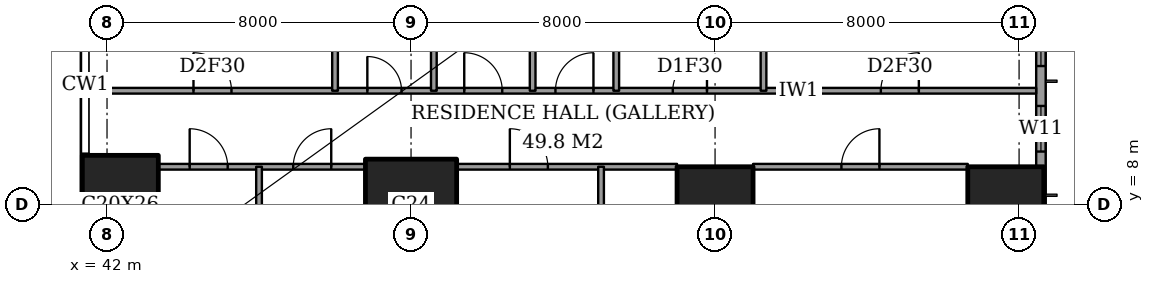
"""IFC4 building model, lengths in metres.
Left out: names, types, materials, properties, quantities, classifications, styles, units other than length and angle.
Written with IfcOpenShell. Run it as: python <this file> out.ifc"""

import sys

from ifc_helpers import new_model, si_unit, direction, frame, frame_2d, origin, origin_2d, place, context, subcontext, project, spatial, rectangle, extrude, element, fill, save


model = new_model("IFC4")
c1 = context("Model", 3, precision=1e-05, world=origin(), true_north=direction((0.0, 1.0)))
c2 = subcontext(c1, "Body", "Model", "MODEL_VIEW")
j1 = project(units=[si_unit("LENGTHUNIT", "METRE"), si_unit("PLANEANGLEUNIT", "RADIAN")], contexts=[c1])
p1 = place(None, origin())
s1 = spatial("IfcSite", under=j1, at=p1, CompositionType="ELEMENT")
p2 = place(p1, origin())
s2 = spatial("IfcBuilding", under=s1, at=p2, CompositionType="ELEMENT")
p3 = place(p2, frame((0.0, 0.0, 168.2)))
s3 = spatial("IfcBuildingStorey", under=s2, at=p3, CompositionType="ELEMENT", Elevation=168.2)
p4 = place(p3, frame((42.35, 8.0, 0.0), z_axis=(0.0, 0.0, 1.0), x_axis=(1.0, 0.0, 0.0)))
e1 = element("IfcColumn", 1, at=p4, inside=s3, PredefinedType="COLUMN", context=c2, shape_type="SweptSolid", body=[
    extrude(rectangle(XDim=2.0, YDim=2.6, at=origin_2d()), origin(), (0.0, 0.0, 1.0), 3.6),
])
p5 = place(p3, frame((50.0, 8.0, 0.0), z_axis=(0.0, 0.0, 1.0), x_axis=(1.0, 0.0, 0.0)))
e2 = element("IfcColumn", 2, at=p5, inside=s3, PredefinedType="COLUMN", context=c2, shape_type="SweptSolid", body=[
    extrude(rectangle(XDim=2.4, YDim=2.4, at=origin_2d()), origin(), (0.0, 0.0, 1.0), 3.6),
])
for number, where, z_axis, x_axis in (
    (3, (58.0, 8.0, 0.0), (0.0, 0.0, 1.0), (1.0, 0.0, 0.0)),
    (4, (65.65, 8.0, 0.0), (0.0, 0.0, 1.0), (1.0, 0.0, 0.0)),
):
    element("IfcColumn", number, at=place(p3, frame(where, z_axis=z_axis, x_axis=x_axis)), inside=s3, PredefinedType="COLUMN", context=c2, shape_type="SweptSolid", body=[
        extrude(rectangle(XDim=2.0, YDim=2.0, at=origin_2d()), origin(), (0.0, 0.0, 1.0), 3.6),
    ])
p6 = place(p3, frame((66.575, 3.175, 0.0), z_axis=(0.0, 0.0, 1.0), x_axis=(0.0, 1.0, 0.0)))
e5 = element("IfcWall", 5, at=p6, inside=s3, PredefinedType="SOLIDWALL", context=c2, shape_type="SweptSolid", body=[
    extrude(rectangle(XDim=41.65, YDim=0.25, at=frame_2d((20.825, 0.0))), origin(), (0.0, 0.0, 1.0), 3.6),
])
p7 = place(p6, frame((0.775, 0.0, 0.4)))
e6 = element("IfcOpeningElement", 6, at=p7, cuts=e5, PredefinedType="OPENING", context=c2, shape_type="SweptSolid", body=[
    extrude(rectangle(XDim=2.4, YDim=2.2, at=frame_2d((1.2, 1.1))), frame((0.0, 0.135, 0.0), z_axis=(0.0, -1.0, 0.0), x_axis=(1.0, 0.0, 0.0)), (0.0, 0.0, 1.0), 0.27),
])
p8 = place(p6, frame((6.225, 0.0, 0.4)))
e7 = element("IfcOpeningElement", 7, at=p8, cuts=e5, PredefinedType="OPENING", context=c2, shape_type="SweptSolid", body=[
    extrude(rectangle(XDim=1.2, YDim=2.2, at=frame_2d((0.6, 1.1))), frame((0.0, 0.135, 0.0), z_axis=(0.0, -1.0, 0.0), x_axis=(1.0, 0.0, 0.0)), (0.0, 0.0, 1.0), 0.27),
])
p9 = place(p6, frame((8.475, 0.0, 0.4)))
e8 = element("IfcOpeningElement", 8, at=p9, cuts=e5, PredefinedType="OPENING", context=c2, shape_type="SweptSolid", body=[
    extrude(rectangle(XDim=2.4, YDim=2.2, at=frame_2d((1.2, 1.1))), frame((0.0, 0.135, 0.0), z_axis=(0.0, -1.0, 0.0), x_axis=(1.0, 0.0, 0.0)), (0.0, 0.0, 1.0), 0.27),
])
p10 = place(p6, frame((15.775, 0.0, 0.4)))
e9 = element("IfcOpeningElement", 9, at=p10, cuts=e5, PredefinedType="OPENING", context=c2, shape_type="SweptSolid", body=[
    extrude(rectangle(XDim=2.4, YDim=2.2, at=frame_2d((1.2, 1.1))), frame((0.0, 0.135, 0.0), z_axis=(0.0, -1.0, 0.0), x_axis=(1.0, 0.0, 0.0)), (0.0, 0.0, 1.0), 0.27),
])
p11 = place(p6, frame((23.475, 0.0, 0.4)))
e10 = element("IfcOpeningElement", 10, at=p11, cuts=e5, PredefinedType="OPENING", context=c2, shape_type="SweptSolid", body=[
    extrude(rectangle(XDim=2.4, YDim=2.2, at=frame_2d((1.2, 1.1))), frame((0.0, 0.135, 0.0), z_axis=(0.0, -1.0, 0.0), x_axis=(1.0, 0.0, 0.0)), (0.0, 0.0, 1.0), 0.27),
])
p12 = place(p6, frame((30.975, 0.0, 0.4)))
e11 = element("IfcOpeningElement", 11, at=p12, cuts=e5, PredefinedType="OPENING", context=c2, shape_type="SweptSolid", body=[
    extrude(rectangle(XDim=2.4, YDim=2.2, at=frame_2d((1.2, 1.1))), frame((0.0, 0.135, 0.0), z_axis=(0.0, -1.0, 0.0), x_axis=(1.0, 0.0, 0.0)), (0.0, 0.0, 1.0), 0.27),
])
p13 = place(p6, frame((34.5, 0.0, 0.4)))
e12 = element("IfcOpeningElement", 12, at=p13, cuts=e5, PredefinedType="OPENING", context=c2, shape_type="SweptSolid", body=[
    extrude(rectangle(XDim=1.2, YDim=2.2, at=frame_2d((0.6, 1.1))), frame((0.0, 0.135, 0.0), z_axis=(0.0, -1.0, 0.0), x_axis=(1.0, 0.0, 0.0)), (0.0, 0.0, 1.0), 0.27),
])
p14 = place(p6, frame((38.475, 0.0, 0.4)))
e13 = element("IfcOpeningElement", 13, at=p14, cuts=e5, PredefinedType="OPENING", context=c2, shape_type="SweptSolid", body=[
    extrude(rectangle(XDim=2.4, YDim=2.2, at=frame_2d((1.2, 1.1))), frame((0.0, 0.135, 0.0), z_axis=(0.0, -1.0, 0.0), x_axis=(1.0, 0.0, 0.0)), (0.0, 0.0, 1.0), 0.27),
])
p15 = place(p3, frame((43.35, 9.0, 0.0), z_axis=(0.0, 0.0, 1.0), x_axis=(1.0, 0.0, 0.0)))
e14 = element("IfcWall", 14, at=p15, inside=s3, PredefinedType="PARTITIONING", context=c2, shape_type="SweptSolid", body=[
    extrude(rectangle(XDim=5.45, YDim=0.15, at=frame_2d((2.725, 0.0))), origin(), (0.0, 0.0, 1.0), 3.25),
])
p16 = place(p15, frame((3.55, 0.0, 0.0)))
e15 = element("IfcOpeningElement", 15, at=p16, cuts=e14, PredefinedType="OPENING", context=c2, shape_type="SweptSolid", body=[
    extrude(rectangle(XDim=1.0, YDim=2.1, at=frame_2d((0.5, 1.05))), frame((0.0, 0.085, 0.0), z_axis=(0.0, -1.0, 0.0), x_axis=(1.0, 0.0, 0.0)), (0.0, 0.0, 1.0), 0.17),
])
p17 = place(p15, frame((0.825, 0.0, 0.0)))
e16 = element("IfcOpeningElement", 16, at=p17, cuts=e14, PredefinedType="OPENING", context=c2, shape_type="SweptSolid", body=[
    extrude(rectangle(XDim=1.0, YDim=2.1, at=frame_2d((0.5, 1.05))), frame((0.0, 0.085, 0.0), z_axis=(0.0, -1.0, 0.0), x_axis=(1.0, 0.0, 0.0)), (0.0, 0.0, 1.0), 0.17),
])
p18 = place(p3, frame((51.2, 9.0, 0.0), z_axis=(0.0, 0.0, 1.0), x_axis=(1.0, 0.0, 0.0)))
e17 = element("IfcWall", 17, at=p18, inside=s3, PredefinedType="PARTITIONING", context=c2, shape_type="SweptSolid", body=[
    extrude(rectangle(XDim=5.8, YDim=0.15, at=frame_2d((2.9, 0.0))), origin(), (0.0, 0.0, 1.0), 3.25),
])
p19 = place(p18, frame((1.4, 0.0, 0.0)))
e18 = element("IfcOpeningElement", 18, at=p19, cuts=e17, PredefinedType="OPENING", context=c2, shape_type="SweptSolid", body=[
    extrude(rectangle(XDim=1.0, YDim=2.1, at=frame_2d((0.5, 1.05))), frame((0.0, 0.085, 0.0), z_axis=(0.0, -1.0, 0.0), x_axis=(1.0, 0.0, 0.0)), (0.0, 0.0, 1.0), 0.17),
])
p20 = place(p3, frame((59.0, 9.0, 0.0), z_axis=(0.0, 0.0, 1.0), x_axis=(1.0, 0.0, 0.0)))
e19 = element("IfcWall", 19, at=p20, inside=s3, PredefinedType="PARTITIONING", context=c2, shape_type="SweptSolid", body=[
    extrude(rectangle(XDim=5.65, YDim=0.15, at=frame_2d((2.825, 0.0))), origin(), (0.0, 0.0, 1.0), 3.25),
])
p21 = place(p20, frame((2.325, 0.0, 0.0)))
e20 = element("IfcOpeningElement", 20, at=p21, cuts=e19, PredefinedType="OPENING", context=c2, shape_type="SweptSolid", body=[
    extrude(rectangle(XDim=1.0, YDim=2.1, at=frame_2d((0.5, 1.05))), frame((0.0, 0.085, 0.0), z_axis=(0.0, -1.0, 0.0), x_axis=(1.0, 0.0, 0.0)), (0.0, 0.0, 1.0), 0.17),
])
p22 = place(p3, frame((41.439, 11.0, 0.0), z_axis=(0.0, 0.0, 1.0), x_axis=(1.0, 0.0, 0.0)))
e21 = element("IfcWall", 21, at=p22, inside=s3, PredefinedType="PARTITIONING", context=c2, shape_type="SweptSolid", body=[
    extrude(rectangle(XDim=25.011, YDim=0.15, at=frame_2d((12.505, 0.0))), origin(), (0.0, 0.0, 1.0), 3.25),
])
p23 = place(p22, frame((12.361, 0.0, 0.0)))
e22 = element("IfcOpeningElement", 22, at=p23, cuts=e21, PredefinedType="OPENING", context=c2, shape_type="SweptSolid", body=[
    extrude(rectangle(XDim=1.0, YDim=2.1, at=frame_2d((0.5, 1.05))), frame((0.0, 0.085, 0.0), z_axis=(0.0, -1.0, 0.0), x_axis=(1.0, 0.0, 0.0)), (0.0, 0.0, 1.0), 0.17),
])
p24 = place(p22, frame((20.924, 0.0, 0.0)))
e23 = element("IfcOpeningElement", 23, at=p24, cuts=e21, PredefinedType="OPENING", context=c2, shape_type="SweptSolid", body=[
    extrude(rectangle(XDim=1.0, YDim=2.1, at=frame_2d((0.5, 1.05))), frame((0.0, 0.085, 0.0), z_axis=(0.0, -1.0, 0.0), x_axis=(1.0, 0.0, 0.0)), (0.0, 0.0, 1.0), 0.17),
])
p25 = place(p22, frame((15.448, 0.0, 0.0)))
e24 = element("IfcOpeningElement", 24, at=p25, cuts=e21, PredefinedType="OPENING", context=c2, shape_type="SweptSolid", body=[
    extrude(rectangle(XDim=0.9, YDim=2.1, at=frame_2d((0.45, 1.05))), frame((0.0, 0.085, 0.0), z_axis=(0.0, -1.0, 0.0), x_axis=(1.0, 0.0, 0.0)), (0.0, 0.0, 1.0), 0.17),
])
p26 = place(p22, frame((9.961, 0.0, 0.0)))
e25 = element("IfcOpeningElement", 25, at=p26, cuts=e21, PredefinedType="OPENING", context=c2, shape_type="SweptSolid", body=[
    extrude(rectangle(XDim=1.0, YDim=2.1, at=frame_2d((0.5, 1.05))), frame((0.0, 0.085, 0.0), z_axis=(0.0, -1.0, 0.0), x_axis=(1.0, 0.0, 0.0)), (0.0, 0.0, 1.0), 0.17),
])
p27 = place(p22, frame((7.411, 0.0, 0.0)))
e26 = element("IfcOpeningElement", 26, at=p27, cuts=e21, PredefinedType="OPENING", context=c2, shape_type="SweptSolid", body=[
    extrude(rectangle(XDim=0.9, YDim=2.1, at=frame_2d((0.45, 1.05))), frame((0.0, 0.085, 0.0), z_axis=(0.0, -1.0, 0.0), x_axis=(1.0, 0.0, 0.0)), (0.0, 0.0, 1.0), 0.17),
])
p28 = place(p22, frame((2.836, 0.0, 0.0)))
e27 = element("IfcOpeningElement", 27, at=p28, cuts=e21, PredefinedType="OPENING", context=c2, shape_type="SweptSolid", body=[
    extrude(rectangle(XDim=1.0, YDim=2.1, at=frame_2d((0.5, 1.05))), frame((0.0, 0.085, 0.0), z_axis=(0.0, -1.0, 0.0), x_axis=(1.0, 0.0, 0.0)), (0.0, 0.0, 1.0), 0.17),
])
p29 = place(p3, frame((46.0, -0.45, 0.0), z_axis=(0.0, 0.0, 1.0), x_axis=(0.0, 1.0, 0.0)))
e28 = element("IfcWall", 28, at=p29, inside=s3, PredefinedType="PARTITIONING", context=c2, shape_type="SweptSolid", body=[
    extrude(rectangle(XDim=9.45, YDim=0.15, at=frame_2d((4.725, 0.0))), origin(), (0.0, 0.0, 1.0), 3.25),
])
p30 = place(p3, frame((48.0, 11.0, 0.0), z_axis=(0.0, 0.0, 1.0), x_axis=(0.0, 1.0, 0.0)))
e29 = element("IfcWall", 29, at=p30, inside=s3, PredefinedType="PARTITIONING", context=c2, shape_type="SweptSolid", body=[
    extrude(rectangle(XDim=6.5, YDim=0.15, at=frame_2d((3.25, 0.0))), origin(), (0.0, 0.0, 1.0), 3.25),
])
p31 = place(p3, frame((50.6, 11.0, 0.0), z_axis=(0.0, 0.0, 1.0), x_axis=(0.0, 1.0, 0.0)))
e30 = element("IfcWall", 30, at=p31, inside=s3, PredefinedType="PARTITIONING", context=c2, shape_type="SweptSolid", body=[
    extrude(rectangle(XDim=3.8, YDim=0.15, at=frame_2d((1.9, 0.0))), origin(), (0.0, 0.0, 1.0), 3.25),
])
p32 = place(p3, frame((53.2, 11.0, 0.0), z_axis=(0.0, 0.0, 1.0), x_axis=(0.0, 1.0, 0.0)))
e31 = element("IfcWall", 31, at=p32, inside=s3, PredefinedType="PARTITIONING", context=c2, shape_type="SweptSolid", body=[
    extrude(rectangle(XDim=6.5, YDim=0.15, at=frame_2d((3.25, 0.0))), origin(), (0.0, 0.0, 1.0), 3.25),
])
p33 = place(p3, frame((55.0, -0.45, 0.0), z_axis=(0.0, 0.0, 1.0), x_axis=(0.0, 1.0, 0.0)))
e32 = element("IfcWall", 32, at=p33, inside=s3, PredefinedType="PARTITIONING", context=c2, shape_type="SweptSolid", body=[
    extrude(rectangle(XDim=9.45, YDim=0.15, at=frame_2d((4.725, 0.0))), origin(), (0.0, 0.0, 1.0), 3.25),
])
p34 = place(p3, frame((55.4, 11.0, 0.0), z_axis=(0.0, 0.0, 1.0), x_axis=(0.0, 1.0, 0.0)))
e33 = element("IfcWall", 33, at=p34, inside=s3, PredefinedType="PARTITIONING", context=c2, shape_type="SweptSolid", body=[
    extrude(rectangle(XDim=10.6, YDim=0.15, at=frame_2d((5.3, 0.0))), origin(), (0.0, 0.0, 1.0), 3.25),
])
p35 = place(p34, frame((8.05, 0.0, 0.0)))
e34 = element("IfcOpeningElement", 34, at=p35, cuts=e33, PredefinedType="OPENING", context=c2, shape_type="SweptSolid", body=[
    extrude(rectangle(XDim=1.0, YDim=2.1, at=frame_2d((0.5, 1.05))), frame((0.0, 0.085, 0.0), z_axis=(0.0, -1.0, 0.0), x_axis=(1.0, 0.0, 0.0)), (0.0, 0.0, 1.0), 0.17),
])
p36 = place(p3, frame((59.275, 11.0, 0.0), z_axis=(0.0, 0.0, 1.0), x_axis=(0.0, 1.0, 0.0)))
e35 = element("IfcWall", 35, at=p36, inside=s3, PredefinedType="PARTITIONING", context=c2, shape_type="SweptSolid", body=[
    extrude(rectangle(XDim=3.8, YDim=0.15, at=frame_2d((1.9, 0.0))), origin(), (0.0, 0.0, 1.0), 3.25),
])
p37 = place(p8, origin())
e36 = element("IfcWindow", 36, at=p37, inside=s3, PartitioningType="SINGLE_PANEL", PredefinedType="WINDOW", context=c2, shape_type="SweptSolid", body=[
    extrude(rectangle(XDim=1.2, YDim=2.2, at=frame_2d((0.6, 1.1))), frame((0.0, 0.03, 0.0), z_axis=(0.0, -1.0, 0.0), x_axis=(1.0, 0.0, 0.0)), (0.0, 0.0, 1.0), 0.06),
])
fill(e7, e36)
p38 = place(p9, origin())
e37 = element("IfcWindow", 37, at=p38, inside=s3, PartitioningType="SINGLE_PANEL", PredefinedType="WINDOW", context=c2, shape_type="SweptSolid", body=[
    extrude(rectangle(XDim=2.4, YDim=2.2, at=frame_2d((1.2, 1.1))), frame((0.0, 0.03, 0.0), z_axis=(0.0, -1.0, 0.0), x_axis=(1.0, 0.0, 0.0)), (0.0, 0.0, 1.0), 0.06),
])
fill(e8, e37)
p39 = place(p21, origin())
e38 = element("IfcDoor", 38, at=p39, inside=s3, OperationType="SINGLE_SWING_LEFT", PredefinedType="DOOR", context=c2, shape_type="SweptSolid", body=[
    extrude(rectangle(XDim=1.0, YDim=2.1, at=frame_2d((0.5, 1.05))), frame((0.0, 0.025, 0.0), z_axis=(0.0, -1.0, 0.0), x_axis=(1.0, 0.0, 0.0)), (0.0, 0.0, 1.0), 0.05),
])
fill(e20, e38)
p40 = place(p19, origin())
e39 = element("IfcDoor", 39, at=p40, inside=s3, OperationType="SINGLE_SWING_RIGHT", PredefinedType="DOOR", context=c2, shape_type="SweptSolid", body=[
    extrude(rectangle(XDim=1.0, YDim=2.1, at=frame_2d((0.5, 1.05))), frame((0.0, 0.025, 0.0), z_axis=(0.0, -1.0, 0.0), x_axis=(1.0, 0.0, 0.0)), (0.0, 0.0, 1.0), 0.05),
])
fill(e18, e39)
p41 = place(p16, origin())
e40 = element("IfcDoor", 40, at=p41, inside=s3, OperationType="SINGLE_SWING_LEFT", PredefinedType="DOOR", context=c2, shape_type="SweptSolid", body=[
    extrude(rectangle(XDim=1.0, YDim=2.1, at=frame_2d((0.5, 1.05))), frame((0.0, 0.025, 0.0), z_axis=(0.0, -1.0, 0.0), x_axis=(1.0, 0.0, 0.0)), (0.0, 0.0, 1.0), 0.05),
])
fill(e15, e40)
p42 = place(p17, origin())
e41 = element("IfcDoor", 41, at=p42, inside=s3, OperationType="SINGLE_SWING_RIGHT", PredefinedType="DOOR", context=c2, shape_type="SweptSolid", body=[
    extrude(rectangle(XDim=1.0, YDim=2.1, at=frame_2d((0.5, 1.05))), frame((0.0, 0.025, 0.0), z_axis=(0.0, -1.0, 0.0), x_axis=(1.0, 0.0, 0.0)), (0.0, 0.0, 1.0), 0.05),
])
fill(e16, e41)
p43 = place(p23, origin())
e42 = element("IfcDoor", 42, at=p43, inside=s3, OperationType="SINGLE_SWING_LEFT", PredefinedType="DOOR", context=c2, shape_type="SweptSolid", body=[
    extrude(rectangle(XDim=1.0, YDim=2.1, at=frame_2d((0.5, 1.05))), frame((0.0, 0.025, 0.0), z_axis=(0.0, -1.0, 0.0), x_axis=(1.0, 0.0, 0.0)), (0.0, 0.0, 1.0), 0.05),
])
fill(e22, e42)
p44 = place(p24, origin())
e43 = element("IfcDoor", 43, at=p44, inside=s3, OperationType="SINGLE_SWING_LEFT", PredefinedType="DOOR", context=c2, shape_type="SweptSolid", body=[
    extrude(rectangle(XDim=1.0, YDim=2.1, at=frame_2d((0.5, 1.05))), frame((0.0, 0.025, 0.0), z_axis=(0.0, -1.0, 0.0), x_axis=(1.0, 0.0, 0.0)), (0.0, 0.0, 1.0), 0.05),
])
fill(e23, e43)
p45 = place(p25, origin())
e44 = element("IfcDoor", 44, at=p45, inside=s3, OperationType="SINGLE_SWING_LEFT", PredefinedType="DOOR", context=c2, shape_type="SweptSolid", body=[
    extrude(rectangle(XDim=0.9, YDim=2.1, at=frame_2d((0.45, 1.05))), frame((0.0, 0.025, 0.0), z_axis=(0.0, -1.0, 0.0), x_axis=(1.0, 0.0, 0.0)), (0.0, 0.0, 1.0), 0.05),
])
fill(e24, e44)
p46 = place(p26, origin())
e45 = element("IfcDoor", 45, at=p46, inside=s3, OperationType="SINGLE_SWING_RIGHT", PredefinedType="DOOR", context=c2, shape_type="SweptSolid", body=[
    extrude(rectangle(XDim=1.0, YDim=2.1, at=frame_2d((0.5, 1.05))), frame((0.0, 0.025, 0.0), z_axis=(0.0, -1.0, 0.0), x_axis=(1.0, 0.0, 0.0)), (0.0, 0.0, 1.0), 0.05),
])
fill(e25, e45)
p47 = place(p27, origin())
e46 = element("IfcDoor", 46, at=p47, inside=s3, OperationType="SINGLE_SWING_RIGHT", PredefinedType="DOOR", context=c2, shape_type="SweptSolid", body=[
    extrude(rectangle(XDim=0.9, YDim=2.1, at=frame_2d((0.45, 1.05))), frame((0.0, 0.025, 0.0), z_axis=(0.0, -1.0, 0.0), x_axis=(1.0, 0.0, 0.0)), (0.0, 0.0, 1.0), 0.05),
])
fill(e26, e46)
p48 = place(p28, origin())
e47 = element("IfcDoor", 47, at=p48, inside=s3, OperationType="SINGLE_SWING_RIGHT", PredefinedType="DOOR", context=c2, shape_type="SweptSolid", body=[
    extrude(rectangle(XDim=1.0, YDim=2.1, at=frame_2d((0.5, 1.05))), frame((0.0, 0.025, 0.0), z_axis=(0.0, -1.0, 0.0), x_axis=(1.0, 0.0, 0.0)), (0.0, 0.0, 1.0), 0.05),
])
fill(e27, e47)
save(model, sys.argv[1])
